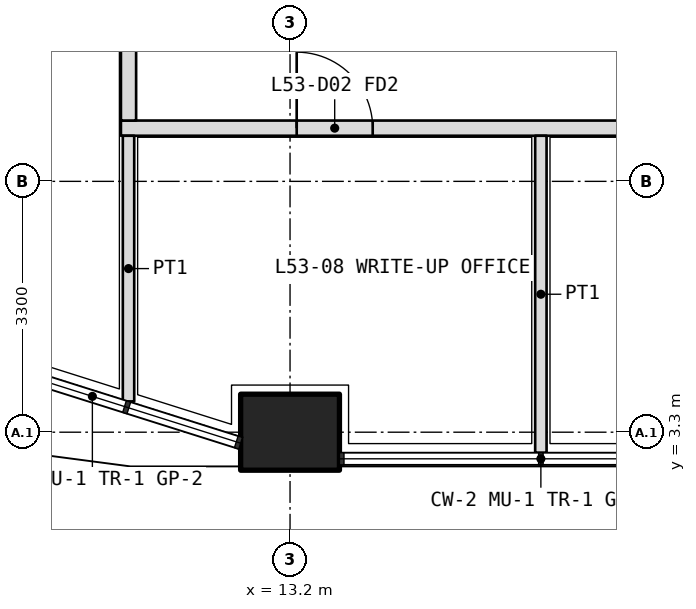
"""IFC4 building model, lengths in metres.
Left out: names, types, materials, properties, quantities, classifications, styles, units other than length and angle.
Written with IfcOpenShell. Run it as: python <this file> out.ifc"""

import sys

from ifc_helpers import new_model, si_unit, direction, frame, frame_2d, origin, origin_2d, place, context, subcontext, project, spatial, rectangle, extrude, element, fill, save


model = new_model("IFC4")
c1 = context("Model", 3, precision=1e-05, world=origin(), true_north=direction((0.0, 1.0)))
c2 = subcontext(c1, "Body", "Model", "MODEL_VIEW")
j1 = project(units=[si_unit("LENGTHUNIT", "METRE"), si_unit("PLANEANGLEUNIT", "RADIAN")], contexts=[c1])
p1 = place(None, origin())
s1 = spatial("IfcSite", under=j1, at=p1, CompositionType="ELEMENT")
p2 = place(p1, origin())
s2 = spatial("IfcBuilding", under=s1, at=p2, CompositionType="ELEMENT")
p3 = place(p2, frame((0.0, 0.0, 233.4)))
s3 = spatial("IfcBuildingStorey", under=s2, at=p3, CompositionType="ELEMENT", Elevation=233.4)
p4 = place(p3, frame((13.2, 3.3, 0.0), z_axis=(0.0, 0.0, 1.0), x_axis=(1.0, 0.0, 0.0)))
e1 = element("IfcColumn", 1, at=p4, inside=s3, PredefinedType="COLUMN", context=c2, shape_type="SweptSolid", body=[
    extrude(rectangle(XDim=1.3, YDim=1.0, at=origin_2d()), origin(), (0.0, 0.0, 1.0), 4.2),
])
p5 = place(p3, frame((10.975, 7.3, 0.0), z_axis=(0.0, 0.0, 1.0), x_axis=(1.0, 0.0, 0.0)))
e2 = element("IfcWall", 2, at=p5, inside=s3, PredefinedType="PARTITIONING", context=c2, shape_type="SweptSolid", body=[
    extrude(rectangle(XDim=30.85, YDim=0.2, at=frame_2d((15.425, 0.0))), origin(), (0.0, 0.0, 1.0), 3.0),
])
p6 = place(p5, frame((2.312, 0.0, 0.0)))
e3 = element("IfcOpeningElement", 3, at=p6, cuts=e2, PredefinedType="OPENING", context=c2, shape_type="SweptSolid", body=[
    extrude(rectangle(XDim=1.0, YDim=2.1, at=frame_2d((0.5, 1.05))), frame((0.0, 0.11, 0.0), z_axis=(0.0, -1.0, 0.0), x_axis=(1.0, 0.0, 0.0)), (0.0, 0.0, 1.0), 0.22),
])
p7 = place(p5, frame((13.275, 0.0, 0.0)))
e4 = element("IfcOpeningElement", 4, at=p7, cuts=e2, PredefinedType="OPENING", context=c2, shape_type="SweptSolid", body=[
    extrude(rectangle(XDim=1.0, YDim=2.1, at=frame_2d((0.5, 1.05))), frame((0.0, 0.11, 0.0), z_axis=(0.0, -1.0, 0.0), x_axis=(1.0, 0.0, 0.0)), (0.0, 0.0, 1.0), 0.22),
])
p8 = place(p5, frame((23.625, 0.0, 0.0)))
e5 = element("IfcOpeningElement", 5, at=p8, cuts=e2, PredefinedType="OPENING", context=c2, shape_type="SweptSolid", body=[
    extrude(rectangle(XDim=1.0, YDim=2.1, at=frame_2d((0.5, 1.05))), frame((0.0, 0.11, 0.0), z_axis=(0.0, -1.0, 0.0), x_axis=(1.0, 0.0, 0.0)), (0.0, 0.0, 1.0), 0.22),
])
p9 = place(p5, frame((26.925, 0.0, 0.0)))
e6 = element("IfcOpeningElement", 6, at=p9, cuts=e2, PredefinedType="OPENING", context=c2, shape_type="SweptSolid", body=[
    extrude(rectangle(XDim=1.0, YDim=2.1, at=frame_2d((0.5, 1.05))), frame((0.0, 0.11, 0.0), z_axis=(0.0, -1.0, 0.0), x_axis=(1.0, 0.0, 0.0)), (0.0, 0.0, 1.0), 0.22),
])
p10 = place(p5, frame((29.188, 0.0, 0.0)))
e7 = element("IfcOpeningElement", 7, at=p10, cuts=e2, PredefinedType="OPENING", context=c2, shape_type="SweptSolid", body=[
    extrude(rectangle(XDim=1.0, YDim=2.1, at=frame_2d((0.5, 1.05))), frame((0.0, 0.11, 0.0), z_axis=(0.0, -1.0, 0.0), x_axis=(1.0, 0.0, 0.0)), (0.0, 0.0, 1.0), 0.22),
])
p11 = place(p3, frame((11.075, 7.4, 0.0), z_axis=(0.0, 0.0, 1.0), x_axis=(0.0, 1.0, 0.0)))
e8 = element("IfcWall", 8, at=p11, inside=s3, PredefinedType="PARTITIONING", context=c2, shape_type="SweptSolid", body=[
    extrude(rectangle(XDim=31.4, YDim=0.2, at=frame_2d((15.7, 0.0))), origin(), (0.0, 0.0, 1.0), 3.0),
])
p12 = place(p11, frame((2.35, 0.0, 0.0)))
e9 = element("IfcOpeningElement", 9, at=p12, cuts=e8, PredefinedType="OPENING", context=c2, shape_type="SweptSolid", body=[
    extrude(rectangle(XDim=1.0, YDim=2.1, at=frame_2d((0.5, 1.05))), frame((0.0, 0.11, 0.0), z_axis=(0.0, -1.0, 0.0), x_axis=(1.0, 0.0, 0.0)), (0.0, 0.0, 1.0), 0.22),
])
p13 = place(p11, frame((6.35, 0.0, 0.0)))
e10 = element("IfcOpeningElement", 10, at=p13, cuts=e8, PredefinedType="OPENING", context=c2, shape_type="SweptSolid", body=[
    extrude(rectangle(XDim=1.0, YDim=2.1, at=frame_2d((0.5, 1.05))), frame((0.0, 0.11, 0.0), z_axis=(0.0, -1.0, 0.0), x_axis=(1.0, 0.0, 0.0)), (0.0, 0.0, 1.0), 0.22),
])
p14 = place(p11, frame((9.45, 0.0, 0.0)))
e11 = element("IfcOpeningElement", 11, at=p14, cuts=e8, PredefinedType="OPENING", context=c2, shape_type="SweptSolid", body=[
    extrude(rectangle(XDim=0.9, YDim=2.1, at=frame_2d((0.45, 1.05))), frame((0.0, 0.11, 0.0), z_axis=(0.0, -1.0, 0.0), x_axis=(1.0, 0.0, 0.0)), (0.0, 0.0, 1.0), 0.22),
])
p15 = place(p11, frame((13.35, 0.0, 0.0)))
e12 = element("IfcOpeningElement", 12, at=p15, cuts=e8, PredefinedType="OPENING", context=c2, shape_type="SweptSolid", body=[
    extrude(rectangle(XDim=0.9, YDim=2.1, at=frame_2d((0.45, 1.05))), frame((0.0, 0.11, 0.0), z_axis=(0.0, -1.0, 0.0), x_axis=(1.0, 0.0, 0.0)), (0.0, 0.0, 1.0), 0.22),
])
p16 = place(p11, frame((18.5, 0.0, 0.0)))
e13 = element("IfcOpeningElement", 13, at=p16, cuts=e8, PredefinedType="OPENING", context=c2, shape_type="SweptSolid", body=[
    extrude(rectangle(XDim=1.0, YDim=2.1, at=frame_2d((0.5, 1.05))), frame((0.0, 0.11, 0.0), z_axis=(0.0, -1.0, 0.0), x_axis=(1.0, 0.0, 0.0)), (0.0, 0.0, 1.0), 0.22),
])
p17 = place(p11, frame((26.4, 0.0, 0.0)))
e14 = element("IfcOpeningElement", 14, at=p17, cuts=e8, PredefinedType="OPENING", context=c2, shape_type="SweptSolid", body=[
    extrude(rectangle(XDim=1.0, YDim=2.1, at=frame_2d((0.5, 1.05))), frame((0.0, 0.11, 0.0), z_axis=(0.0, -1.0, 0.0), x_axis=(1.0, 0.0, 0.0)), (0.0, 0.0, 1.0), 0.22),
])
p18 = place(p3, frame((11.075, 3.705, 0.0), z_axis=(0.0, 0.0, 1.0), x_axis=(0.0, 1.0, 0.0)))
e15 = element("IfcWall", 15, at=p18, inside=s3, PredefinedType="PARTITIONING", context=c2, shape_type="SweptSolid", body=[
    extrude(rectangle(XDim=3.495, YDim=0.15, at=frame_2d((1.748, 0.0))), origin(), (0.0, 0.0, 1.0), 2.7),
])
p19 = place(p3, frame((16.5, 3.03, 0.0), z_axis=(0.0, 0.0, 1.0), x_axis=(0.0, 1.0, 0.0)))
e16 = element("IfcWall", 16, at=p19, inside=s3, PredefinedType="PARTITIONING", context=c2, shape_type="SweptSolid", body=[
    extrude(rectangle(XDim=4.17, YDim=0.15, at=frame_2d((2.085, 0.0))), origin(), (0.0, 0.0, 1.0), 2.7),
])
p20 = place(p6, origin())
e17 = element("IfcDoor", 17, at=p20, inside=s3, OperationType="SINGLE_SWING_LEFT", PredefinedType="DOOR", context=c2, shape_type="SweptSolid", body=[
    extrude(rectangle(XDim=1.0, YDim=2.1, at=frame_2d((0.5, 1.05))), frame((0.0, 0.025, 0.0), z_axis=(0.0, -1.0, 0.0), x_axis=(1.0, 0.0, 0.0)), (0.0, 0.0, 1.0), 0.05),
])
fill(e3, e17)
save(model, sys.argv[1])
